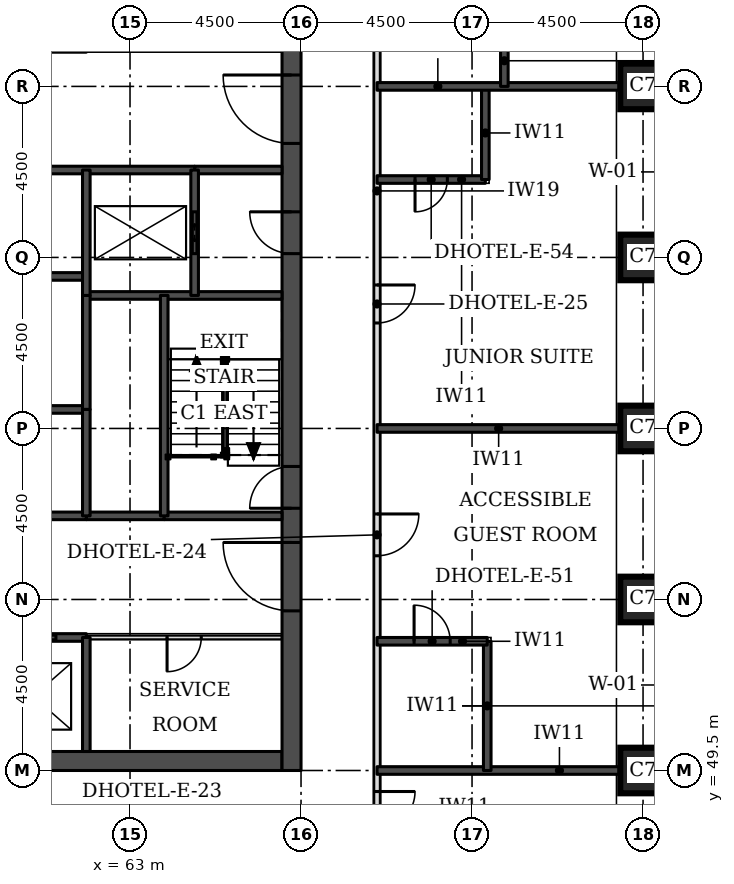
"""IFC4 building model, lengths in metres.
Left out: names, types, materials, properties, quantities, classifications, styles, units other than length and angle.
Written with IfcOpenShell. Run it as: python <this file> out.ifc"""

import sys

from ifc_helpers import new_model, si_unit, direction, frame, frame_2d, origin, origin_2d, place, context, subcontext, project, spatial, rectangle, extrude, element, fill, save


model = new_model("IFC4")
c1 = context("Model", 3, precision=1e-05, world=origin(), true_north=direction((0.0, 1.0)))
c2 = subcontext(c1, "Body", "Model", "MODEL_VIEW")
j1 = project(units=[si_unit("LENGTHUNIT", "METRE"), si_unit("PLANEANGLEUNIT", "RADIAN")], contexts=[c1])
p1 = place(None, origin())
s1 = spatial("IfcSite", under=j1, at=p1, CompositionType="ELEMENT")
p2 = place(p1, origin())
s2 = spatial("IfcBuilding", under=s1, at=p2, CompositionType="ELEMENT")
p3 = place(p2, frame((0.0, 0.0, 39.6)))
s3 = spatial("IfcBuildingStorey", under=s2, at=p3, CompositionType="ELEMENT", Elevation=39.6)
for number, where, z_axis, x_axis in (
    (1, (76.5, 49.5, 0.0), (0.0, 0.0, 1.0), (1.0, 0.0, 0.0)),
    (2, (76.5, 54.0, 0.0), (0.0, 0.0, 1.0), (1.0, 0.0, 0.0)),
    (3, (76.5, 58.5, 0.0), (0.0, 0.0, 1.0), (1.0, 0.0, 0.0)),
    (4, (76.5, 63.0, 0.0), (0.0, 0.0, 1.0), (1.0, 0.0, 0.0)),
    (5, (76.5, 67.5, 0.0), (0.0, 0.0, 1.0), (1.0, 0.0, 0.0)),
):
    element("IfcColumn", number, at=place(p3, frame(where, z_axis=z_axis, x_axis=x_axis)), inside=s3, PredefinedType="COLUMN", context=c2, shape_type="SweptSolid", body=[
        extrude(rectangle(XDim=1.2, YDim=1.2, at=origin_2d()), origin(), (0.0, 0.0, 1.0), 3.3),
    ])
p4 = place(p3, frame((45.5, 49.75, 0.0), z_axis=(0.0, 0.0, 1.0), x_axis=(1.0, 0.0, 0.0)))
e6 = element("IfcWall", 6, at=p4, inside=s3, PredefinedType="SHEAR", context=c2, shape_type="SweptSolid", body=[
    extrude(rectangle(XDim=21.5, YDim=0.5, at=frame_2d((10.75, 0.0))), origin(), (0.0, 0.0, 1.0), 3.3),
])
p5 = place(p3, frame((67.25, 49.5, 0.0), z_axis=(0.0, 0.0, 1.0), x_axis=(0.0, 1.0, 0.0)))
e7 = element("IfcWall", 7, at=p5, inside=s3, PredefinedType="SHEAR", context=c2, shape_type="SweptSolid", body=[
    extrude(rectangle(XDim=22.5, YDim=0.5, at=frame_2d((11.25, 0.0))), origin(), (0.0, 0.0, 1.0), 3.3),
])
p6 = place(p5, frame((4.2, 0.0, 0.0)))
e8 = element("IfcOpeningElement", 8, at=p6, cuts=e7, PredefinedType="OPENING", context=c2, shape_type="SweptSolid", body=[
    extrude(rectangle(XDim=1.8, YDim=2.1, at=frame_2d((0.9, 1.05))), frame((0.0, 0.26, 0.0), z_axis=(0.0, -1.0, 0.0), x_axis=(1.0, 0.0, 0.0)), (0.0, 0.0, 1.0), 0.52),
])
p7 = place(p5, frame((6.9, 0.0, 0.0)))
e9 = element("IfcOpeningElement", 9, at=p7, cuts=e7, PredefinedType="OPENING", context=c2, shape_type="SweptSolid", body=[
    extrude(rectangle(XDim=1.1, YDim=2.1, at=frame_2d((0.55, 1.05))), frame((0.0, 0.26, 0.0), z_axis=(0.0, -1.0, 0.0), x_axis=(1.0, 0.0, 0.0)), (0.0, 0.0, 1.0), 0.52),
])
p8 = place(p5, frame((13.6, 0.0, 0.0)))
e10 = element("IfcOpeningElement", 10, at=p8, cuts=e7, PredefinedType="OPENING", context=c2, shape_type="SweptSolid", body=[
    extrude(rectangle(XDim=1.1, YDim=2.1, at=frame_2d((0.55, 1.05))), frame((0.0, 0.26, 0.0), z_axis=(0.0, -1.0, 0.0), x_axis=(1.0, 0.0, 0.0)), (0.0, 0.0, 1.0), 0.52),
])
p9 = place(p5, frame((16.5, 0.0, 0.0)))
e11 = element("IfcOpeningElement", 11, at=p9, cuts=e7, PredefinedType="OPENING", context=c2, shape_type="SweptSolid", body=[
    extrude(rectangle(XDim=1.8, YDim=2.1, at=frame_2d((0.9, 1.05))), frame((0.0, 0.26, 0.0), z_axis=(0.0, -1.0, 0.0), x_axis=(1.0, 0.0, 0.0)), (0.0, 0.0, 1.0), 0.52),
])
p10 = place(p3, frame((69.5, 47.5, 0.0), z_axis=(0.0, 0.0, 1.0), x_axis=(0.0, 1.0, 0.0)))
e12 = element("IfcWall", 12, at=p10, inside=s3, PredefinedType="PARTITIONING", context=c2, shape_type="SweptSolid", body=[
    extrude(rectangle(XDim=26.5, YDim=0.15, at=frame_2d((13.25, 0.0))), origin(), (0.0, 0.0, 1.0), 3.08),
])
p11 = place(p10, frame((25.053, 0.0, 0.0)))
e13 = element("IfcOpeningElement", 13, at=p11, cuts=e12, PredefinedType="OPENING", context=c2, shape_type="SweptSolid", body=[
    extrude(rectangle(XDim=1.0, YDim=2.1, at=frame_2d((0.5, 1.05))), frame((0.0, 0.085, 0.0), z_axis=(0.0, -1.0, 0.0), x_axis=(1.0, 0.0, 0.0)), (0.0, 0.0, 1.0), 0.17),
])
p12 = place(p10, frame((13.775, 0.0, 0.0)))
e14 = element("IfcOpeningElement", 14, at=p12, cuts=e12, PredefinedType="OPENING", context=c2, shape_type="SweptSolid", body=[
    extrude(rectangle(XDim=1.0, YDim=2.1, at=frame_2d((0.5, 1.05))), frame((0.0, 0.085, 0.0), z_axis=(0.0, -1.0, 0.0), x_axis=(1.0, 0.0, 0.0)), (0.0, 0.0, 1.0), 0.17),
])
p13 = place(p10, frame((7.65, 0.0, 0.0)))
e15 = element("IfcOpeningElement", 15, at=p13, cuts=e12, PredefinedType="OPENING", context=c2, shape_type="SweptSolid", body=[
    extrude(rectangle(XDim=1.1, YDim=2.1, at=frame_2d((0.55, 1.05))), frame((0.0, 0.085, 0.0), z_axis=(0.0, -1.0, 0.0), x_axis=(1.0, 0.0, 0.0)), (0.0, 0.0, 1.0), 0.17),
])
p14 = place(p10, frame((0.447, 0.0, 0.0)))
e16 = element("IfcOpeningElement", 16, at=p14, cuts=e12, PredefinedType="OPENING", context=c2, shape_type="SweptSolid", body=[
    extrude(rectangle(XDim=1.0, YDim=2.1, at=frame_2d((0.5, 1.05))), frame((0.0, 0.085, 0.0), z_axis=(0.0, -1.0, 0.0), x_axis=(1.0, 0.0, 0.0)), (0.0, 0.0, 1.0), 0.17),
])
p15 = place(p3, frame((69.5, 49.5, 0.0), z_axis=(0.0, 0.0, 1.0), x_axis=(1.0, 0.0, 0.0)))
e17 = element("IfcWall", 17, at=p15, inside=s3, PredefinedType="SOLIDWALL", context=c2, shape_type="SweptSolid", body=[
    extrude(rectangle(XDim=6.4, YDim=0.2, at=frame_2d((3.2, 0.0))), origin(), (0.0, 0.0, 1.0), 3.08),
])
p16 = place(p3, frame((72.4, 49.5, 0.0), z_axis=(0.0, 0.0, 1.0), x_axis=(0.0, 1.0, 0.0)))
e18 = element("IfcWall", 18, at=p16, inside=s3, PredefinedType="SOLIDWALL", context=c2, shape_type="SweptSolid", body=[
    extrude(rectangle(XDim=3.4, YDim=0.2, at=frame_2d((1.7, 0.0))), origin(), (0.0, 0.0, 1.0), 3.08),
])
p17 = place(p3, frame((69.5, 52.9, 0.0), z_axis=(0.0, 0.0, 1.0), x_axis=(1.0, 0.0, 0.0)))
e19 = element("IfcWall", 19, at=p17, inside=s3, PredefinedType="SOLIDWALL", context=c2, shape_type="SweptSolid", body=[
    extrude(rectangle(XDim=2.9, YDim=0.2, at=frame_2d((1.45, 0.0))), origin(), (0.0, 0.0, 1.0), 3.08),
])
p18 = place(p17, frame((0.975, 0.0, 0.0)))
e20 = element("IfcOpeningElement", 20, at=p18, cuts=e19, PredefinedType="OPENING", context=c2, shape_type="SweptSolid", body=[
    extrude(rectangle(XDim=0.95, YDim=2.1, at=frame_2d((0.475, 1.05))), frame((0.0, 0.11, 0.0), z_axis=(0.0, -1.0, 0.0), x_axis=(1.0, 0.0, 0.0)), (0.0, 0.0, 1.0), 0.22),
])
p19 = place(p3, frame((69.5, 58.5, 0.0), z_axis=(0.0, 0.0, 1.0), x_axis=(1.0, 0.0, 0.0)))
e21 = element("IfcWall", 21, at=p19, inside=s3, PredefinedType="SOLIDWALL", context=c2, shape_type="SweptSolid", body=[
    extrude(rectangle(XDim=6.4, YDim=0.2, at=frame_2d((3.2, 0.0))), origin(), (0.0, 0.0, 1.0), 3.08),
])
p20 = place(p3, frame((69.5, 65.05, 0.0), z_axis=(0.0, 0.0, 1.0), x_axis=(1.0, 0.0, 0.0)))
e22 = element("IfcWall", 22, at=p20, inside=s3, PredefinedType="SOLIDWALL", context=c2, shape_type="SweptSolid", body=[
    extrude(rectangle(XDim=2.85, YDim=0.2, at=frame_2d((1.425, 0.0))), origin(), (0.0, 0.0, 1.0), 3.08),
])
p21 = place(p20, frame((1.0, 0.0, 0.0)))
e23 = element("IfcOpeningElement", 23, at=p21, cuts=e22, PredefinedType="OPENING", context=c2, shape_type="SweptSolid", body=[
    extrude(rectangle(XDim=0.85, YDim=2.1, at=frame_2d((0.425, 1.05))), frame((0.0, 0.11, 0.0), z_axis=(0.0, -1.0, 0.0), x_axis=(1.0, 0.0, 0.0)), (0.0, 0.0, 1.0), 0.22),
])
p22 = place(p3, frame((72.35, 65.05, 0.0), z_axis=(0.0, 0.0, 1.0), x_axis=(0.0, 1.0, 0.0)))
e24 = element("IfcWall", 24, at=p22, inside=s3, PredefinedType="SOLIDWALL", context=c2, shape_type="SweptSolid", body=[
    extrude(rectangle(XDim=2.45, YDim=0.2, at=frame_2d((1.225, 0.0))), origin(), (0.0, 0.0, 1.0), 3.08),
])
p23 = place(p3, frame((69.5, 67.5, 0.0), z_axis=(0.0, 0.0, 1.0), x_axis=(1.0, 0.0, 0.0)))
e25 = element("IfcWall", 25, at=p23, inside=s3, PredefinedType="SOLIDWALL", context=c2, shape_type="SweptSolid", body=[
    extrude(rectangle(XDim=6.4, YDim=0.2, at=frame_2d((3.2, 0.0))), origin(), (0.0, 0.0, 1.0), 3.08),
])
p24 = place(p3, frame((72.85, 67.5, 0.0), z_axis=(0.0, 0.0, 1.0), x_axis=(0.0, 1.0, 0.0)))
e26 = element("IfcWall", 26, at=p24, inside=s3, PredefinedType="SOLIDWALL", context=c2, shape_type="SweptSolid", body=[
    extrude(rectangle(XDim=2.95, YDim=0.2, at=frame_2d((1.475, 0.0))), origin(), (0.0, 0.0, 1.0), 3.08),
])
p25 = place(p3, frame((61.85, 53.0, 0.0), z_axis=(0.0, 0.0, 1.0), x_axis=(1.0, 0.0, 0.0)))
e27 = element("IfcWall", 27, at=p25, inside=s3, PredefinedType="PARTITIONING", context=c2, shape_type="SweptSolid", body=[
    extrude(rectangle(XDim=5.15, YDim=0.1, at=frame_2d((2.575, 0.0))), origin(), (0.0, 0.0, 1.0), 3.08),
])
p26 = place(p25, frame((2.125, 0.0, 0.0)))
e28 = element("IfcOpeningElement", 28, at=p26, cuts=e27, PredefinedType="OPENING", context=c2, shape_type="SweptSolid", body=[
    extrude(rectangle(XDim=0.9, YDim=2.1, at=frame_2d((0.45, 1.05))), frame((0.0, 0.06, 0.0), z_axis=(0.0, -1.0, 0.0), x_axis=(1.0, 0.0, 0.0)), (0.0, 0.0, 1.0), 0.12),
])
p27 = place(p3, frame((50.65, 53.0, 0.0), z_axis=(0.0, 0.0, 1.0), x_axis=(1.0, 0.0, 0.0)))
e29 = element("IfcWall", 29, at=p27, inside=s3, PredefinedType="SOLIDWALL", context=c2, shape_type="SweptSolid", body=[
    extrude(rectangle(XDim=11.2, YDim=0.2, at=frame_2d((5.6, 0.0))), origin(), (0.0, 0.0, 1.0), 3.08),
])
p28 = place(p27, frame((0.8, 0.0, 0.0)))
e30 = element("IfcOpeningElement", 30, at=p28, cuts=e29, PredefinedType="OPENING", context=c2, shape_type="SweptSolid", body=[
    extrude(rectangle(XDim=1.2, YDim=2.1, at=frame_2d((0.6, 1.05))), frame((0.0, 0.11, 0.0), z_axis=(0.0, -1.0, 0.0), x_axis=(1.0, 0.0, 0.0)), (0.0, 0.0, 1.0), 0.22),
])
p29 = place(p27, frame((3.6, 0.0, 0.0)))
e31 = element("IfcOpeningElement", 31, at=p29, cuts=e29, PredefinedType="OPENING", context=c2, shape_type="SweptSolid", body=[
    extrude(rectangle(XDim=1.2, YDim=2.1, at=frame_2d((0.6, 1.05))), frame((0.0, 0.11, 0.0), z_axis=(0.0, -1.0, 0.0), x_axis=(1.0, 0.0, 0.0)), (0.0, 0.0, 1.0), 0.22),
])
p30 = place(p27, frame((6.4, 0.0, 0.0)))
e32 = element("IfcOpeningElement", 32, at=p30, cuts=e29, PredefinedType="OPENING", context=c2, shape_type="SweptSolid", body=[
    extrude(rectangle(XDim=1.2, YDim=2.1, at=frame_2d((0.6, 1.05))), frame((0.0, 0.11, 0.0), z_axis=(0.0, -1.0, 0.0), x_axis=(1.0, 0.0, 0.0)), (0.0, 0.0, 1.0), 0.22),
])
p31 = place(p27, frame((9.2, 0.0, 0.0)))
e33 = element("IfcOpeningElement", 33, at=p31, cuts=e29, PredefinedType="OPENING", context=c2, shape_type="SweptSolid", body=[
    extrude(rectangle(XDim=1.2, YDim=2.1, at=frame_2d((0.6, 1.05))), frame((0.0, 0.11, 0.0), z_axis=(0.0, -1.0, 0.0), x_axis=(1.0, 0.0, 0.0)), (0.0, 0.0, 1.0), 0.22),
])
p32 = place(p3, frame((61.85, 56.2, 0.0), z_axis=(0.0, 0.0, 1.0), x_axis=(1.0, 0.0, 0.0)))
e34 = element("IfcWall", 34, at=p32, inside=s3, PredefinedType="SOLIDWALL", context=c2, shape_type="SweptSolid", body=[
    extrude(rectangle(XDim=2.05, YDim=0.2, at=frame_2d((1.025, 0.0))), origin(), (0.0, 0.0, 1.0), 3.08),
])
p33 = place(p3, frame((50.65, 56.2, 0.0), z_axis=(0.0, 0.0, 1.0), x_axis=(1.0, 0.0, 0.0)))
e35 = element("IfcWall", 35, at=p33, inside=s3, PredefinedType="SOLIDWALL", context=c2, shape_type="SweptSolid", body=[
    extrude(rectangle(XDim=11.2, YDim=0.2, at=frame_2d((5.6, 0.0))), origin(), (0.0, 0.0, 1.0), 3.08),
])
p34 = place(p3, frame((63.9, 56.2, 0.0), z_axis=(0.0, 0.0, 1.0), x_axis=(1.0, 0.0, 0.0)))
e36 = element("IfcWall", 36, at=p34, inside=s3, PredefinedType="SOLIDWALL", context=c2, shape_type="SweptSolid", body=[
    extrude(rectangle(XDim=3.1, YDim=0.2, at=frame_2d((1.55, 0.0))), origin(), (0.0, 0.0, 1.0), 3.08),
])
p35 = place(p3, frame((50.65, 59.0, 0.0), z_axis=(0.0, 0.0, 1.0), x_axis=(1.0, 0.0, 0.0)))
e37 = element("IfcWall", 37, at=p35, inside=s3, PredefinedType="SOLIDWALL", context=c2, shape_type="SweptSolid", body=[
    extrude(rectangle(XDim=11.2, YDim=0.2, at=frame_2d((5.6, 0.0))), origin(), (0.0, 0.0, 1.0), 3.3),
])
p36 = place(p3, frame((61.85, 62.0, 0.0), z_axis=(0.0, 0.0, 1.0), x_axis=(1.0, 0.0, 0.0)))
e38 = element("IfcWall", 38, at=p36, inside=s3, PredefinedType="SOLIDWALL", context=c2, shape_type="SweptSolid", body=[
    extrude(rectangle(XDim=5.15, YDim=0.2, at=frame_2d((2.575, 0.0))), origin(), (0.0, 0.0, 1.0), 3.08),
])
p37 = place(p3, frame((50.65, 62.5, 0.0), z_axis=(0.0, 0.0, 1.0), x_axis=(1.0, 0.0, 0.0)))
e39 = element("IfcWall", 39, at=p37, inside=s3, PredefinedType="SOLIDWALL", context=c2, shape_type="SweptSolid", body=[
    extrude(rectangle(XDim=11.2, YDim=0.2, at=frame_2d((5.6, 0.0))), origin(), (0.0, 0.0, 1.0), 3.3),
])
p38 = place(p3, frame((64.7, 65.3, 0.0), z_axis=(0.0, 0.0, 1.0), x_axis=(1.0, 0.0, 0.0)))
e40 = element("IfcWall", 40, at=p38, inside=s3, PredefinedType="SOLIDWALL", context=c2, shape_type="SweptSolid", body=[
    extrude(rectangle(XDim=2.3, YDim=0.2, at=frame_2d((1.15, 0.0))), origin(), (0.0, 0.0, 1.0), 3.08),
])
p39 = place(p3, frame((47.8, 65.3, 0.0), z_axis=(0.0, 0.0, 1.0), x_axis=(1.0, 0.0, 0.0)))
e41 = element("IfcWall", 41, at=p39, inside=s3, PredefinedType="SOLIDWALL", context=c2, shape_type="SweptSolid", body=[
    extrude(rectangle(XDim=16.9, YDim=0.2, at=frame_2d((8.45, 0.0))), origin(), (0.0, 0.0, 1.0), 3.08),
])
p40 = place(p3, frame((61.85, 59.0, 0.0), z_axis=(0.0, 0.0, 1.0), x_axis=(0.0, 1.0, 0.0)))
e42 = element("IfcWall", 42, at=p40, inside=s3, PredefinedType="SOLIDWALL", context=c2, shape_type="SweptSolid", body=[
    extrude(rectangle(XDim=3.0, YDim=0.2, at=frame_2d((1.5, 0.0))), origin(), (0.0, 0.0, 1.0), 3.3),
])
p41 = place(p3, frame((61.85, 50.0, 0.0), z_axis=(0.0, 0.0, 1.0), x_axis=(0.0, 1.0, 0.0)))
e43 = element("IfcWall", 43, at=p41, inside=s3, PredefinedType="SOLIDWALL", context=c2, shape_type="SweptSolid", body=[
    extrude(rectangle(XDim=3.0, YDim=0.2, at=frame_2d((1.5, 0.0))), origin(), (0.0, 0.0, 1.0), 3.08),
])
p42 = place(p3, frame((61.85, 56.2, 0.0), z_axis=(0.0, 0.0, 1.0), x_axis=(0.0, 1.0, 0.0)))
e44 = element("IfcWall", 44, at=p42, inside=s3, PredefinedType="SOLIDWALL", context=c2, shape_type="SweptSolid", body=[
    extrude(rectangle(XDim=2.8, YDim=0.2, at=frame_2d((1.4, 0.0))), origin(), (0.0, 0.0, 1.0), 3.08),
])
p43 = place(p3, frame((61.85, 62.0, 0.0), z_axis=(0.0, 0.0, 1.0), x_axis=(0.0, 1.0, 0.0)))
e45 = element("IfcWall", 45, at=p43, inside=s3, PredefinedType="SOLIDWALL", context=c2, shape_type="SweptSolid", body=[
    extrude(rectangle(XDim=3.3, YDim=0.2, at=frame_2d((1.65, 0.0))), origin(), (0.0, 0.0, 1.0), 3.08),
])
p44 = place(p3, frame((63.9, 56.2, 0.0), z_axis=(0.0, 0.0, 1.0), x_axis=(0.0, 1.0, 0.0)))
e46 = element("IfcWall", 46, at=p44, inside=s3, PredefinedType="SOLIDWALL", context=c2, shape_type="SweptSolid", body=[
    extrude(rectangle(XDim=5.8, YDim=0.2, at=frame_2d((2.9, 0.0))), origin(), (0.0, 0.0, 1.0), 3.08),
])
p45 = place(p3, frame((64.7, 62.0, 0.0), z_axis=(0.0, 0.0, 1.0), x_axis=(0.0, 1.0, 0.0)))
e47 = element("IfcWall", 47, at=p45, inside=s3, PredefinedType="SOLIDWALL", context=c2, shape_type="SweptSolid", body=[
    extrude(rectangle(XDim=3.3, YDim=0.2, at=frame_2d((1.65, 0.0))), origin(), (0.0, 0.0, 1.0), 3.08),
])
p46 = place(p45, frame((1.1, 0.0, 0.0)))
e48 = element("IfcOpeningElement", 48, at=p46, cuts=e47, PredefinedType="OPENING", context=c2, shape_type="SweptSolid", body=[
    extrude(rectangle(XDim=1.1, YDim=2.1, at=frame_2d((0.55, 1.05))), frame((0.0, 0.11, 0.0), z_axis=(0.0, -1.0, 0.0), x_axis=(1.0, 0.0, 0.0)), (0.0, 0.0, 1.0), 0.22),
])
p47 = place(p12, frame((1.0, 0.0, 0.0), z_axis=(0.0, 0.0, 1.0), x_axis=(-1.0, 0.0, 0.0)))
e49 = element("IfcDoor", 49, at=p47, inside=s3, OperationType="SINGLE_SWING_LEFT", PredefinedType="DOOR", context=c2, shape_type="SweptSolid", body=[
    extrude(rectangle(XDim=1.0, YDim=2.1, at=frame_2d((0.5, 1.05))), frame((0.0, 0.025, 0.0), z_axis=(0.0, -1.0, 0.0), x_axis=(1.0, 0.0, 0.0)), (0.0, 0.0, 1.0), 0.05),
])
fill(e14, e49)
p48 = place(p21, frame((0.85, 0.0, 0.0), z_axis=(0.0, 0.0, 1.0), x_axis=(-1.0, 0.0, 0.0)))
e50 = element("IfcDoor", 50, at=p48, inside=s3, OperationType="SINGLE_SWING_RIGHT", PredefinedType="DOOR", context=c2, shape_type="SweptSolid", body=[
    extrude(rectangle(XDim=0.85, YDim=2.1, at=frame_2d((0.425, 1.05))), frame((0.0, 0.025, 0.0), z_axis=(0.0, -1.0, 0.0), x_axis=(1.0, 0.0, 0.0)), (0.0, 0.0, 1.0), 0.05),
])
fill(e23, e50)
p49 = place(p13, frame((1.1, 0.0, 0.0), z_axis=(0.0, 0.0, 1.0), x_axis=(-1.0, 0.0, 0.0)))
e51 = element("IfcDoor", 51, at=p49, inside=s3, OperationType="SINGLE_SWING_LEFT", PredefinedType="DOOR", context=c2, shape_type="SweptSolid", body=[
    extrude(rectangle(XDim=1.1, YDim=2.1, at=frame_2d((0.55, 1.05))), frame((0.0, 0.025, 0.0), z_axis=(0.0, -1.0, 0.0), x_axis=(1.0, 0.0, 0.0)), (0.0, 0.0, 1.0), 0.05),
])
fill(e15, e51)
p50 = place(p18, origin())
e52 = element("IfcDoor", 52, at=p50, inside=s3, OperationType="SINGLE_SWING_LEFT", PredefinedType="DOOR", context=c2, shape_type="SweptSolid", body=[
    extrude(rectangle(XDim=0.95, YDim=2.1, at=frame_2d((0.475, 1.05))), frame((0.0, 0.025, 0.0), z_axis=(0.0, -1.0, 0.0), x_axis=(1.0, 0.0, 0.0)), (0.0, 0.0, 1.0), 0.05),
])
fill(e20, e52)
p51 = place(p14, frame((1.0, 0.0, 0.0), z_axis=(0.0, 0.0, 1.0), x_axis=(-1.0, 0.0, 0.0)))
e53 = element("IfcDoor", 53, at=p51, inside=s3, OperationType="SINGLE_SWING_LEFT", PredefinedType="DOOR", context=c2, shape_type="SweptSolid", body=[
    extrude(rectangle(XDim=1.0, YDim=2.1, at=frame_2d((0.5, 1.05))), frame((0.0, 0.025, 0.0), z_axis=(0.0, -1.0, 0.0), x_axis=(1.0, 0.0, 0.0)), (0.0, 0.0, 1.0), 0.05),
])
fill(e16, e53)
p52 = place(p31, origin())
e54 = element("IfcDoor", 54, at=p52, inside=s3, OperationType="DOUBLE_DOOR_SLIDING", PredefinedType="DOOR", context=c2, shape_type="SweptSolid", body=[
    extrude(rectangle(XDim=1.2, YDim=2.1, at=frame_2d((0.6, 1.05))), frame((0.0, 0.025, 0.0), z_axis=(0.0, -1.0, 0.0), x_axis=(1.0, 0.0, 0.0)), (0.0, 0.0, 1.0), 0.05),
])
fill(e33, e54)
p53 = place(p46, origin())
e55 = element("IfcDoor", 55, at=p53, inside=s3, OperationType="DOUBLE_DOOR_SLIDING", PredefinedType="DOOR", context=c2, shape_type="SweptSolid", body=[
    extrude(rectangle(XDim=1.1, YDim=2.1, at=frame_2d((0.55, 1.05))), frame((0.0, 0.025, 0.0), z_axis=(0.0, -1.0, 0.0), x_axis=(1.0, 0.0, 0.0)), (0.0, 0.0, 1.0), 0.05),
])
fill(e48, e55)
p54 = place(p6, origin())
e56 = element("IfcDoor", 56, at=p54, inside=s3, OperationType="SINGLE_SWING_RIGHT", PredefinedType="DOOR", context=c2, shape_type="SweptSolid", body=[
    extrude(rectangle(XDim=1.8, YDim=2.1, at=frame_2d((0.9, 1.05))), frame((0.0, 0.025, 0.0), z_axis=(0.0, -1.0, 0.0), x_axis=(1.0, 0.0, 0.0)), (0.0, 0.0, 1.0), 0.05),
])
fill(e8, e56)
p55 = place(p7, origin())
e57 = element("IfcDoor", 57, at=p55, inside=s3, OperationType="SINGLE_SWING_LEFT", PredefinedType="DOOR", context=c2, shape_type="SweptSolid", body=[
    extrude(rectangle(XDim=1.1, YDim=2.1, at=frame_2d((0.55, 1.05))), frame((0.0, 0.025, 0.0), z_axis=(0.0, -1.0, 0.0), x_axis=(1.0, 0.0, 0.0)), (0.0, 0.0, 1.0), 0.05),
])
fill(e9, e57)
p56 = place(p8, origin())
e58 = element("IfcDoor", 58, at=p56, inside=s3, OperationType="SINGLE_SWING_RIGHT", PredefinedType="DOOR", context=c2, shape_type="SweptSolid", body=[
    extrude(rectangle(XDim=1.1, YDim=2.1, at=frame_2d((0.55, 1.05))), frame((0.0, 0.025, 0.0), z_axis=(0.0, -1.0, 0.0), x_axis=(1.0, 0.0, 0.0)), (0.0, 0.0, 1.0), 0.05),
])
fill(e10, e58)
p57 = place(p9, origin())
e59 = element("IfcDoor", 59, at=p57, inside=s3, OperationType="SINGLE_SWING_RIGHT", PredefinedType="DOOR", context=c2, shape_type="SweptSolid", body=[
    extrude(rectangle(XDim=1.8, YDim=2.1, at=frame_2d((0.9, 1.05))), frame((0.0, 0.025, 0.0), z_axis=(0.0, -1.0, 0.0), x_axis=(1.0, 0.0, 0.0)), (0.0, 0.0, 1.0), 0.05),
])
fill(e11, e59)
p58 = place(p26, frame((0.9, 0.0, 0.0), z_axis=(0.0, 0.0, 1.0), x_axis=(-1.0, 0.0, 0.0)))
e60 = element("IfcDoor", 60, at=p58, inside=s3, OperationType="SINGLE_SWING_RIGHT", PredefinedType="DOOR", context=c2, shape_type="SweptSolid", body=[
    extrude(rectangle(XDim=0.9, YDim=2.1, at=frame_2d((0.45, 1.05))), frame((0.0, 0.025, 0.0), z_axis=(0.0, -1.0, 0.0), x_axis=(1.0, 0.0, 0.0)), (0.0, 0.0, 1.0), 0.05),
])
fill(e28, e60)
save(model, sys.argv[1])
